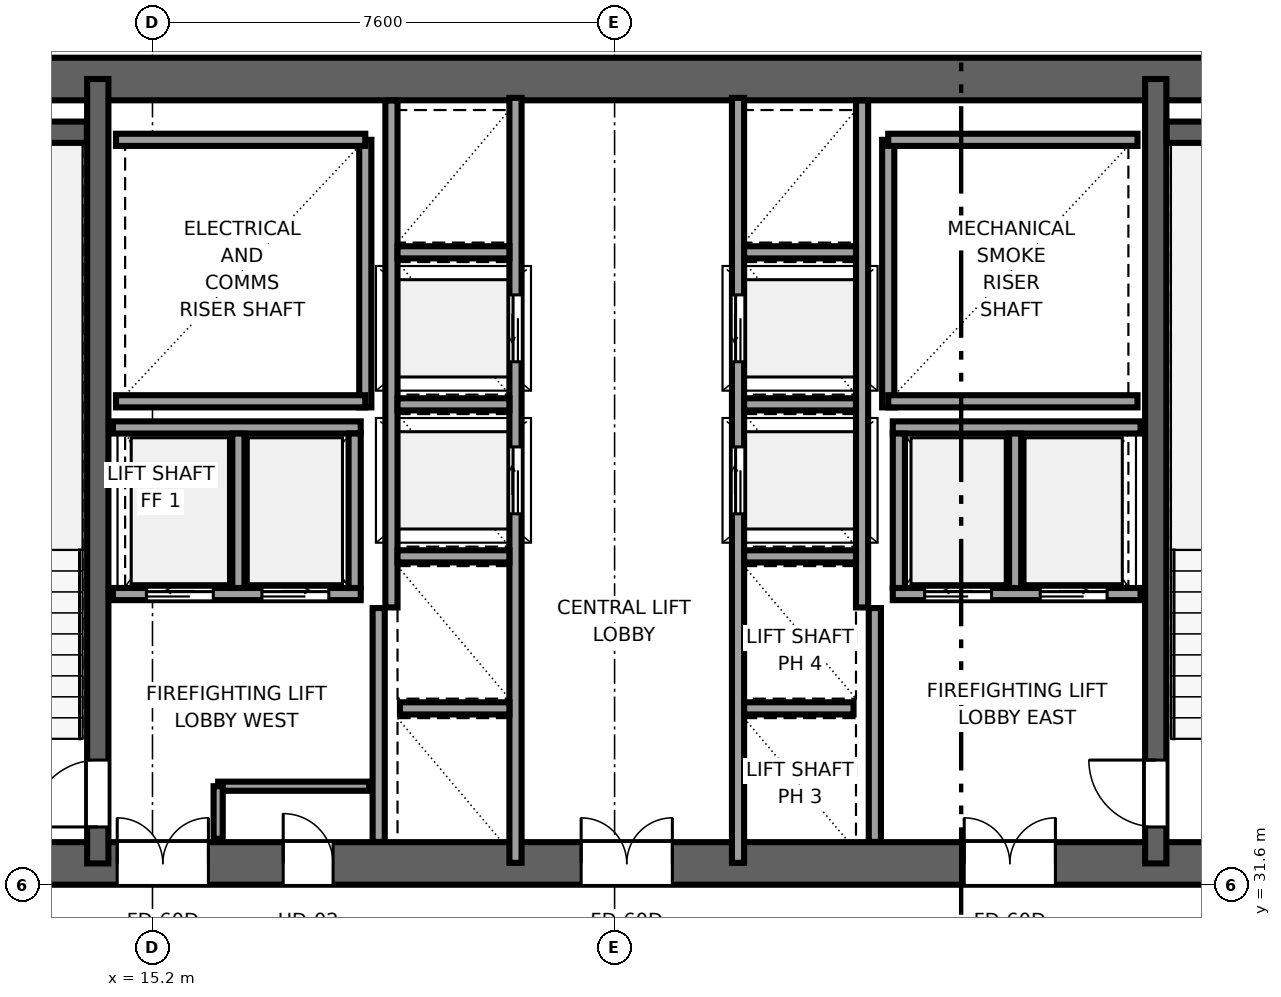
"""IFC4 building model, lengths in metres.
Left out: names, types, materials, properties, quantities, classifications, styles, units other than length and angle.
Written with IfcOpenShell. Run it as: python <this file> out.ifc"""

import sys

from ifc_helpers import new_model, si_unit, direction, frame, frame_2d, origin, place, context, subcontext, project, spatial, rectangle, extrude, source, transform, mapped, element, fill, save


model = new_model("IFC4")
c1 = context("Model", 3, precision=1e-05, world=origin(), true_north=direction((0.0, 1.0)))
c2 = subcontext(c1, "Body", "Model", "MODEL_VIEW")
j1 = project(units=[si_unit("LENGTHUNIT", "METRE"), si_unit("PLANEANGLEUNIT", "RADIAN")], contexts=[c1])
p1 = place(None, origin())
s1 = spatial("IfcSite", under=j1, at=p1, CompositionType="ELEMENT")
p2 = place(p1, origin())
s2 = spatial("IfcBuilding", under=s1, at=p2, CompositionType="ELEMENT")
p3 = place(p2, frame((0.0, 0.0, 143.5)))
s3 = spatial("IfcBuildingStorey", under=s2, at=p3, CompositionType="ELEMENT", Elevation=143.5)
p4 = place(p3, frame((9.8, 31.95, 0.0), z_axis=(0.0, 0.0, 1.0), x_axis=(1.0, 0.0, 0.0)))
e1 = element("IfcWall", 1, at=p4, inside=s3, PredefinedType="SHEAR", context=c2, shape_type="SweptSolid", body=[
    extrude(rectangle(XDim=26.4, YDim=0.7, at=frame_2d((13.2, 0.0))), origin(), (0.0, 0.0, 1.0), 3.55),
])
p5 = place(p4, frame((6.32, 0.0, 0.0), z_axis=(0.0, 0.0, 1.0), x_axis=(-1.0, 0.0, 0.0)))
e2 = element("IfcOpeningElement", 2, at=p5, cuts=e1, PredefinedType="OPENING", context=c2, shape_type="SweptSolid", body=[
    extrude(rectangle(XDim=1.5, YDim=2.04, at=frame_2d((0.75, 1.02))), frame((0.0, 0.36, 0.0), z_axis=(0.0, -1.0, 0.0), x_axis=(1.0, 0.0, 0.0)), (0.0, 0.0, 1.0), 0.72),
])
p6 = place(p4, frame((13.95, 0.0, 0.0), z_axis=(0.0, 0.0, 1.0), x_axis=(-1.0, 0.0, 0.0)))
e3 = element("IfcOpeningElement", 3, at=p6, cuts=e1, PredefinedType="OPENING", context=c2, shape_type="SweptSolid", body=[
    extrude(rectangle(XDim=1.5, YDim=2.04, at=frame_2d((0.75, 1.02))), frame((0.0, 0.36, 0.0), z_axis=(0.0, -1.0, 0.0), x_axis=(1.0, 0.0, 0.0)), (0.0, 0.0, 1.0), 0.72),
])
p7 = place(p4, frame((20.25, 0.0, 0.0), z_axis=(0.0, 0.0, 1.0), x_axis=(-1.0, 0.0, 0.0)))
e4 = element("IfcOpeningElement", 4, at=p7, cuts=e1, PredefinedType="OPENING", context=c2, shape_type="SweptSolid", body=[
    extrude(rectangle(XDim=1.5, YDim=2.04, at=frame_2d((0.75, 1.02))), frame((0.0, 0.36, 0.0), z_axis=(0.0, -1.0, 0.0), x_axis=(1.0, 0.0, 0.0)), (0.0, 0.0, 1.0), 0.72),
])
p8 = place(p4, frame((8.37, 0.0, 0.0), z_axis=(0.0, 0.0, 1.0), x_axis=(-1.0, 0.0, 0.0)))
e5 = element("IfcOpeningElement", 5, at=p8, cuts=e1, PredefinedType="OPENING", context=c2, shape_type="SweptSolid", body=[
    extrude(rectangle(XDim=0.82, YDim=2.01, at=frame_2d((0.41, 1.005))), frame((0.0, 0.36, 0.0), z_axis=(0.0, -1.0, 0.0), x_axis=(1.0, 0.0, 0.0)), (0.0, 0.0, 1.0), 0.72),
])
p9 = place(p3, frame((9.8, 44.85, 0.0), z_axis=(0.0, 0.0, 1.0), x_axis=(1.0, 0.0, 0.0)))
e6 = element("IfcWall", 6, at=p9, inside=s3, PredefinedType="SHEAR", context=c2, shape_type="SweptSolid", body=[
    extrude(rectangle(XDim=26.4, YDim=0.7, at=frame_2d((13.2, 0.0))), origin(), (0.0, 0.0, 1.0), 3.55),
])
p10 = place(p3, frame((14.3, 31.95, 0.0), z_axis=(0.0, 0.0, 1.0), x_axis=(0.0, 1.0, 0.0)))
e7 = element("IfcWall", 7, at=p10, inside=s3, PredefinedType="SHEAR", context=c2, shape_type="SweptSolid", body=[
    extrude(rectangle(XDim=12.9, YDim=0.35, at=frame_2d((6.45, 0.0))), origin(), (0.0, 0.0, 1.0), 3.55),
])
p11 = place(p10, frame((0.6, 0.0, 0.0)))
e8 = element("IfcOpeningElement", 8, at=p11, cuts=e7, PredefinedType="OPENING", context=c2, shape_type="SweptSolid", body=[
    extrude(rectangle(XDim=1.1, YDim=2.12, at=frame_2d((0.55, 1.06))), frame((0.0, 0.185, 0.0), z_axis=(0.0, -1.0, 0.0), x_axis=(1.0, 0.0, 0.0)), (0.0, 0.0, 1.0), 0.37),
])
p12 = place(p3, frame((31.7, 31.95, 0.0), z_axis=(0.0, 0.0, 1.0), x_axis=(0.0, 1.0, 0.0)))
e9 = element("IfcWall", 9, at=p12, inside=s3, PredefinedType="SHEAR", context=c2, shape_type="SweptSolid", body=[
    extrude(rectangle(XDim=12.9, YDim=0.35, at=frame_2d((6.45, 0.0))), origin(), (0.0, 0.0, 1.0), 3.55),
])
p13 = place(p12, frame((1.7, 0.0, 0.0), z_axis=(0.0, 0.0, 1.0), x_axis=(-1.0, 0.0, 0.0)))
e10 = element("IfcOpeningElement", 10, at=p13, cuts=e9, PredefinedType="OPENING", context=c2, shape_type="SweptSolid", body=[
    extrude(rectangle(XDim=1.1, YDim=2.12, at=frame_2d((0.55, 1.06))), frame((0.0, 0.185, 0.0), z_axis=(0.0, -1.0, 0.0), x_axis=(1.0, 0.0, 0.0)), (0.0, 0.0, 1.0), 0.37),
])
for number, where, z_axis, x_axis in (
    (11, (10.52, 43.975, 0.0), (0.0, 0.0, 1.0), (1.0, 0.0, 0.0)),
    (12, (31.88, 43.975, 0.0), (0.0, 0.0, 1.0), (1.0, 0.0, 0.0)),
):
    element("IfcWall", number, at=place(p3, frame(where, z_axis=z_axis, x_axis=x_axis)), inside=s3, PredefinedType="SHEAR", context=c2, shape_type="SweptSolid", body=[
        extrude(rectangle(XDim=3.6, YDim=0.35, at=frame_2d((1.8, 0.0))), origin(), (0.0, 0.0, 1.0), 3.55),
    ])
p14 = place(p3, frame((18.7, 39.45, 0.0), z_axis=(0.0, 0.0, 1.0), x_axis=(0.0, 1.0, 0.0)))
e13 = element("IfcWall", 13, at=p14, inside=s3, PredefinedType="SOLIDWALL", context=c2, shape_type="SweptSolid", body=[
    extrude(rectangle(XDim=4.4, YDim=0.2, at=frame_2d((2.2, 0.0))), origin(), (0.0, 0.0, 1.0), 3.29),
])
for number, where, z_axis, x_axis in (
    (14, (14.6, 39.55, 0.0), (0.0, 0.0, 1.0), (1.0, 0.0, 0.0)),
    (15, (14.6, 43.85, 0.0), (0.0, 0.0, 1.0), (1.0, 0.0, 0.0)),
):
    element("IfcWall", number, at=place(p3, frame(where, z_axis=z_axis, x_axis=x_axis)), inside=s3, PredefinedType="SOLIDWALL", context=c2, shape_type="SweptSolid", body=[
        extrude(rectangle(XDim=4.1, YDim=0.2, at=frame_2d((2.05, 0.0))), origin(), (0.0, 0.0, 1.0), 3.29),
    ])
p15 = place(p3, frame((27.3, 39.45, 0.0), z_axis=(0.0, 0.0, 1.0), x_axis=(0.0, 1.0, 0.0)))
e16 = element("IfcWall", 16, at=p15, inside=s3, PredefinedType="SOLIDWALL", context=c2, shape_type="SweptSolid", body=[
    extrude(rectangle(XDim=4.4, YDim=0.2, at=frame_2d((2.2, 0.0))), origin(), (0.0, 0.0, 1.0), 3.29),
])
for number, where, z_axis, x_axis in (
    (17, (27.3, 39.55, 0.0), (0.0, 0.0, 1.0), (1.0, 0.0, 0.0)),
    (18, (27.3, 43.85, 0.0), (0.0, 0.0, 1.0), (1.0, 0.0, 0.0)),
):
    element("IfcWall", number, at=place(p3, frame(where, z_axis=z_axis, x_axis=x_axis)), inside=s3, PredefinedType="SOLIDWALL", context=c2, shape_type="SweptSolid", body=[
        extrude(rectangle(XDim=4.1, YDim=0.2, at=frame_2d((2.05, 0.0))), origin(), (0.0, 0.0, 1.0), 3.29),
    ])
for number, where, z_axis, x_axis in (
    (19, (18.92, 32.304, 0.0), (0.0, 0.0, 1.0), (0.0, 1.0, 0.0)),
    (20, (27.08, 32.304, 0.0), (0.0, 0.0, 1.0), (0.0, 1.0, 0.0)),
):
    element("IfcWall", number, at=place(p3, frame(where, z_axis=z_axis, x_axis=x_axis)), inside=s3, PredefinedType="SOLIDWALL", context=c2, shape_type="SweptSolid", body=[
        extrude(rectangle(XDim=3.846, YDim=0.2, at=frame_2d((1.923, 0.0))), origin(), (0.0, 0.0, 1.0), 3.29),
    ])
p16 = place(p3, frame((21.17, 31.96, 0.0), z_axis=(0.0, 0.0, 1.0), x_axis=(0.0, 1.0, 0.0)))
e21 = element("IfcWall", 21, at=p16, inside=s3, PredefinedType="SOLIDWALL", context=c2, shape_type="SweptSolid", body=[
    extrude(rectangle(XDim=12.58, YDim=0.2, at=frame_2d((6.29, 0.0))), origin(), (0.0, 0.0, 1.0), 3.29),
])
p17 = place(p16, frame((5.74, 0.0, 0.0)))
e22 = element("IfcOpeningElement", 22, at=p17, cuts=e21, PredefinedType="OPENING", context=c2, shape_type="SweptSolid", body=[
    extrude(rectangle(XDim=1.1, YDim=2.12, at=frame_2d((0.55, 1.06))), frame((0.0, 0.11, 0.0), z_axis=(0.0, -1.0, 0.0), x_axis=(1.0, 0.0, 0.0)), (0.0, 0.0, 1.0), 0.22),
])
p18 = place(p16, frame((8.24, 0.0, 0.0)))
e23 = element("IfcOpeningElement", 23, at=p18, cuts=e21, PredefinedType="OPENING", context=c2, shape_type="SweptSolid", body=[
    extrude(rectangle(XDim=1.1, YDim=2.12, at=frame_2d((0.55, 1.06))), frame((0.0, 0.11, 0.0), z_axis=(0.0, -1.0, 0.0), x_axis=(1.0, 0.0, 0.0)), (0.0, 0.0, 1.0), 0.22),
])
p19 = place(p3, frame((19.13, 36.16, 0.0), z_axis=(0.0, 0.0, 1.0), x_axis=(0.0, 1.0, 0.0)))
e24 = element("IfcWall", 24, at=p19, inside=s3, PredefinedType="SOLIDWALL", context=c2, shape_type="SweptSolid", body=[
    extrude(rectangle(XDim=8.336, YDim=0.2, at=frame_2d((4.168, 0.0))), origin(), (0.0, 0.0, 1.0), 3.29),
])
p20 = place(p3, frame((19.27, 34.5, 0.0), z_axis=(0.0, 0.0, 1.0), x_axis=(1.0, 0.0, 0.0)))
e25 = element("IfcWall", 25, at=p20, inside=s3, PredefinedType="SOLIDWALL", context=c2, shape_type="SweptSolid", body=[
    extrude(rectangle(XDim=1.8, YDim=0.2, at=frame_2d((0.9, 0.0))), origin(), (0.0, 0.0, 1.0), 3.29),
])
for number, where, z_axis, x_axis in (
    (26, (19.23, 37.0, 0.0), (0.0, 0.0, 1.0), (1.0, 0.0, 0.0)),
    (27, (19.23, 39.5, 0.0), (0.0, 0.0, 1.0), (1.0, 0.0, 0.0)),
    (28, (19.23, 42.0, 0.0), (0.0, 0.0, 1.0), (1.0, 0.0, 0.0)),
):
    element("IfcWall", number, at=place(p3, frame(where, z_axis=z_axis, x_axis=x_axis)), inside=s3, PredefinedType="SOLIDWALL", context=c2, shape_type="SweptSolid", body=[
        extrude(rectangle(XDim=1.84, YDim=0.2, at=frame_2d((0.92, 0.0))), origin(), (0.0, 0.0, 1.0), 3.29),
    ])
p21 = place(p3, frame((27.375, 36.38, 0.0), z_axis=(0.0, 0.0, 1.0), x_axis=(1.0, 0.0, 0.0)))
e29 = element("IfcWall", 29, at=p21, inside=s3, PredefinedType="SOLIDWALL", context=c2, shape_type="SweptSolid", body=[
    extrude(rectangle(XDim=4.075, YDim=0.2, at=frame_2d((2.038, 0.0))), origin(), (0.0, 0.0, 1.0), 3.29),
])
p22 = place(p21, frame((0.525, 0.0, 0.0)))
e30 = element("IfcOpeningElement", 30, at=p22, cuts=e29, PredefinedType="OPENING", context=c2, shape_type="SweptSolid", body=[
    extrude(rectangle(XDim=1.1, YDim=2.12, at=frame_2d((0.55, 1.06))), frame((0.0, 0.11, 0.0), z_axis=(0.0, -1.0, 0.0), x_axis=(1.0, 0.0, 0.0)), (0.0, 0.0, 1.0), 0.22),
])
p23 = place(p21, frame((2.425, 0.0, 0.0)))
e31 = element("IfcOpeningElement", 31, at=p23, cuts=e29, PredefinedType="OPENING", context=c2, shape_type="SweptSolid", body=[
    extrude(rectangle(XDim=1.1, YDim=2.12, at=frame_2d((0.55, 1.06))), frame((0.0, 0.11, 0.0), z_axis=(0.0, -1.0, 0.0), x_axis=(1.0, 0.0, 0.0)), (0.0, 0.0, 1.0), 0.22),
])
p24 = place(p3, frame((27.375, 39.12, 0.0), z_axis=(0.0, 0.0, 1.0), x_axis=(1.0, 0.0, 0.0)))
e32 = element("IfcWall", 32, at=p24, inside=s3, PredefinedType="SOLIDWALL", context=c2, shape_type="SweptSolid", body=[
    extrude(rectangle(XDim=4.075, YDim=0.2, at=frame_2d((2.038, 0.0))), origin(), (0.0, 0.0, 1.0), 3.29),
])
for number, where, z_axis, x_axis in (
    (33, (27.475, 36.48, 0.0), (0.0, 0.0, 1.0), (0.0, 1.0, 0.0)),
    (34, (29.387, 36.48, 0.0), (0.0, 0.0, 1.0), (0.0, 1.0, 0.0)),
):
    element("IfcWall", number, at=place(p3, frame(where, z_axis=z_axis, x_axis=x_axis)), inside=s3, PredefinedType="SOLIDWALL", context=c2, shape_type="SweptSolid", body=[
        extrude(rectangle(XDim=2.54, YDim=0.2, at=frame_2d((1.27, 0.0))), origin(), (0.0, 0.0, 1.0), 3.29),
    ])
p25 = place(p3, frame((14.55, 36.38, 0.0), z_axis=(0.0, 0.0, 1.0), x_axis=(1.0, 0.0, 0.0)))
e35 = element("IfcWall", 35, at=p25, inside=s3, PredefinedType="SOLIDWALL", context=c2, shape_type="SweptSolid", body=[
    extrude(rectangle(XDim=4.075, YDim=0.2, at=frame_2d((2.038, 0.0))), origin(), (0.0, 0.0, 1.0), 3.29),
])
p26 = place(p25, frame((0.55, 0.0, 0.0)))
e36 = element("IfcOpeningElement", 36, at=p26, cuts=e35, PredefinedType="OPENING", context=c2, shape_type="SweptSolid", body=[
    extrude(rectangle(XDim=1.1, YDim=2.12, at=frame_2d((0.55, 1.06))), frame((0.0, 0.11, 0.0), z_axis=(0.0, -1.0, 0.0), x_axis=(1.0, 0.0, 0.0)), (0.0, 0.0, 1.0), 0.22),
])
p27 = place(p25, frame((2.45, 0.0, 0.0)))
e37 = element("IfcOpeningElement", 37, at=p27, cuts=e35, PredefinedType="OPENING", context=c2, shape_type="SweptSolid", body=[
    extrude(rectangle(XDim=1.1, YDim=2.12, at=frame_2d((0.55, 1.06))), frame((0.0, 0.11, 0.0), z_axis=(0.0, -1.0, 0.0), x_axis=(1.0, 0.0, 0.0)), (0.0, 0.0, 1.0), 0.22),
])
p28 = place(p3, frame((14.55, 39.12, 0.0), z_axis=(0.0, 0.0, 1.0), x_axis=(1.0, 0.0, 0.0)))
e38 = element("IfcWall", 38, at=p28, inside=s3, PredefinedType="SOLIDWALL", context=c2, shape_type="SweptSolid", body=[
    extrude(rectangle(XDim=4.075, YDim=0.2, at=frame_2d((2.038, 0.0))), origin(), (0.0, 0.0, 1.0), 3.29),
])
for number, where, z_axis, x_axis in (
    (39, (18.525, 36.48, 0.0), (0.0, 0.0, 1.0), (0.0, 1.0, 0.0)),
    (40, (16.613, 36.48, 0.0), (0.0, 0.0, 1.0), (0.0, 1.0, 0.0)),
):
    element("IfcWall", number, at=place(p3, frame(where, z_axis=z_axis, x_axis=x_axis)), inside=s3, PredefinedType="SOLIDWALL", context=c2, shape_type="SweptSolid", body=[
        extrude(rectangle(XDim=2.54, YDim=0.2, at=frame_2d((1.27, 0.0))), origin(), (0.0, 0.0, 1.0), 3.29),
    ])
p29 = place(p3, frame((24.83, 31.96, 0.0), z_axis=(0.0, 0.0, 1.0), x_axis=(0.0, 1.0, 0.0)))
e41 = element("IfcWall", 41, at=p29, inside=s3, PredefinedType="SOLIDWALL", context=c2, shape_type="SweptSolid", body=[
    extrude(rectangle(XDim=12.58, YDim=0.2, at=frame_2d((6.29, 0.0))), origin(), (0.0, 0.0, 1.0), 3.29),
])
p30 = place(p29, frame((5.74, 0.0, 0.0)))
e42 = element("IfcOpeningElement", 42, at=p30, cuts=e41, PredefinedType="OPENING", context=c2, shape_type="SweptSolid", body=[
    extrude(rectangle(XDim=1.1, YDim=2.12, at=frame_2d((0.55, 1.06))), frame((0.0, 0.11, 0.0), z_axis=(0.0, -1.0, 0.0), x_axis=(1.0, 0.0, 0.0)), (0.0, 0.0, 1.0), 0.22),
])
p31 = place(p29, frame((8.24, 0.0, 0.0)))
e43 = element("IfcOpeningElement", 43, at=p31, cuts=e41, PredefinedType="OPENING", context=c2, shape_type="SweptSolid", body=[
    extrude(rectangle(XDim=1.1, YDim=2.12, at=frame_2d((0.55, 1.06))), frame((0.0, 0.11, 0.0), z_axis=(0.0, -1.0, 0.0), x_axis=(1.0, 0.0, 0.0)), (0.0, 0.0, 1.0), 0.22),
])
p32 = place(p3, frame((26.87, 36.16, 0.0), z_axis=(0.0, 0.0, 1.0), x_axis=(0.0, 1.0, 0.0)))
e44 = element("IfcWall", 44, at=p32, inside=s3, PredefinedType="SOLIDWALL", context=c2, shape_type="SweptSolid", body=[
    extrude(rectangle(XDim=8.336, YDim=0.2, at=frame_2d((4.168, 0.0))), origin(), (0.0, 0.0, 1.0), 3.29),
])
p33 = place(p3, frame((24.93, 34.5, 0.0), z_axis=(0.0, 0.0, 1.0), x_axis=(1.0, 0.0, 0.0)))
e45 = element("IfcWall", 45, at=p33, inside=s3, PredefinedType="SOLIDWALL", context=c2, shape_type="SweptSolid", body=[
    extrude(rectangle(XDim=1.8, YDim=0.2, at=frame_2d((0.9, 0.0))), origin(), (0.0, 0.0, 1.0), 3.29),
])
for number, where, z_axis, x_axis in (
    (46, (24.93, 37.0, 0.0), (0.0, 0.0, 1.0), (1.0, 0.0, 0.0)),
    (47, (24.93, 39.5, 0.0), (0.0, 0.0, 1.0), (1.0, 0.0, 0.0)),
    (48, (24.93, 42.0, 0.0), (0.0, 0.0, 1.0), (1.0, 0.0, 0.0)),
):
    element("IfcWall", number, at=place(p3, frame(where, z_axis=z_axis, x_axis=x_axis)), inside=s3, PredefinedType="SOLIDWALL", context=c2, shape_type="SweptSolid", body=[
        extrude(rectangle(XDim=1.84, YDim=0.2, at=frame_2d((0.92, 0.0))), origin(), (0.0, 0.0, 1.0), 3.29),
    ])
p34 = place(p3, frame((16.28, 33.22, 0.0), z_axis=(0.0, 0.0, 1.0), x_axis=(1.0, 0.0, 0.0)))
e49 = element("IfcWall", 49, at=p34, inside=s3, PredefinedType="PARTITIONING", context=c2, shape_type="SweptSolid", body=[
    extrude(rectangle(XDim=2.485, YDim=0.15, at=frame_2d((1.242, 0.0))), origin(), (0.0, 0.0, 1.0), 3.29),
])
p35 = place(p3, frame((16.28, 32.355, 0.0), z_axis=(0.0, 0.0, 1.0), x_axis=(0.0, 1.0, 0.0)))
e50 = element("IfcWall", 50, at=p35, inside=s3, PredefinedType="PARTITIONING", context=c2, shape_type="SweptSolid", body=[
    extrude(rectangle(XDim=0.865, YDim=0.15, at=frame_2d((0.433, 0.0))), origin(), (0.0, 0.0, 1.0), 3.29),
])
m1 = source(origin(), c2, "Body", "SweptSolid", [
    extrude(rectangle(XDim=1.1, YDim=2.12, at=frame_2d((0.55, 1.06))), frame((0.0, 0.025, 0.0), z_axis=(0.0, -1.0, 0.0), x_axis=(1.0, 0.0, 0.0)), (0.0, 0.0, 1.0), 0.05),
])
p36 = place(p11, origin())
e51 = element("IfcDoor", 51, at=p36, inside=s3, OperationType="SINGLE_SWING_LEFT", PredefinedType="DOOR", context=c2, shape_type="MappedRepresentation", body=[
    mapped(m1, transform((0.0, 0.0, 0.0), x_axis=(1.0, 0.0, 0.0), y_axis=(0.0, 1.0, 0.0), z_axis=(0.0, 0.0, 1.0), scale=1.0)),
])
fill(e8, e51)
p37 = place(p13, origin())
e52 = element("IfcDoor", 52, at=p37, inside=s3, OperationType="SINGLE_SWING_RIGHT", PredefinedType="DOOR", context=c2, shape_type="MappedRepresentation", body=[
    mapped(m1, transform((0.0, 0.0, 0.0), x_axis=(1.0, 0.0, 0.0), y_axis=(0.0, 1.0, 0.0), z_axis=(0.0, 0.0, 1.0), scale=1.0)),
])
fill(e10, e52)
m2 = source(origin(), c2, "Body", "SweptSolid", [
    extrude(rectangle(XDim=1.5, YDim=2.04, at=frame_2d((0.75, 1.02))), frame((0.0, 0.025, 0.0), z_axis=(0.0, -1.0, 0.0), x_axis=(1.0, 0.0, 0.0)), (0.0, 0.0, 1.0), 0.05),
])
p38 = place(p5, origin())
e53 = element("IfcDoor", 53, at=p38, inside=s3, OperationType="DOUBLE_DOOR_SINGLE_SWING", PredefinedType="DOOR", context=c2, shape_type="MappedRepresentation", body=[
    mapped(m2, transform((0.0, 0.0, 0.0), x_axis=(1.0, 0.0, 0.0), y_axis=(0.0, 1.0, 0.0), z_axis=(0.0, 0.0, 1.0), scale=1.0)),
])
fill(e2, e53)
p39 = place(p6, origin())
e54 = element("IfcDoor", 54, at=p39, inside=s3, OperationType="DOUBLE_DOOR_SINGLE_SWING", PredefinedType="DOOR", context=c2, shape_type="MappedRepresentation", body=[
    mapped(m2, transform((0.0, 0.0, 0.0), x_axis=(1.0, 0.0, 0.0), y_axis=(0.0, 1.0, 0.0), z_axis=(0.0, 0.0, 1.0), scale=1.0)),
])
fill(e3, e54)
p40 = place(p7, origin())
e55 = element("IfcDoor", 55, at=p40, inside=s3, OperationType="DOUBLE_DOOR_SINGLE_SWING", PredefinedType="DOOR", context=c2, shape_type="MappedRepresentation", body=[
    mapped(m2, transform((0.0, 0.0, 0.0), x_axis=(1.0, 0.0, 0.0), y_axis=(0.0, 1.0, 0.0), z_axis=(0.0, 0.0, 1.0), scale=1.0)),
])
fill(e4, e55)
m3 = source(origin(), c2, "Body", "SweptSolid", [
    extrude(rectangle(XDim=0.82, YDim=2.01, at=frame_2d((0.41, 1.005))), frame((0.0, 0.025, 0.0), z_axis=(0.0, -1.0, 0.0), x_axis=(1.0, 0.0, 0.0)), (0.0, 0.0, 1.0), 0.05),
])
p41 = place(p8, origin())
e56 = element("IfcDoor", 56, at=p41, inside=s3, OperationType="SINGLE_SWING_LEFT", PredefinedType="DOOR", context=c2, shape_type="MappedRepresentation", body=[
    mapped(m3, transform((0.0, 0.0, 0.0), x_axis=(1.0, 0.0, 0.0), y_axis=(0.0, 1.0, 0.0), z_axis=(0.0, 0.0, 1.0), scale=1.0)),
])
fill(e5, e56)
m4 = source(origin(), c2, "Body", "SweptSolid", [
    extrude(rectangle(XDim=1.1, YDim=2.12, at=frame_2d((0.55, 1.06))), frame((0.0, 0.025, 0.0), z_axis=(0.0, -1.0, 0.0), x_axis=(1.0, 0.0, 0.0)), (0.0, 0.0, 1.0), 0.05),
])
p42 = place(p17, origin())
e57 = element("IfcDoor", 57, at=p42, inside=s3, OperationType="SLIDING_TO_RIGHT", PredefinedType="DOOR", context=c2, shape_type="MappedRepresentation", body=[
    mapped(m4, transform((0.0, 0.0, 0.0), x_axis=(1.0, 0.0, 0.0), y_axis=(0.0, 1.0, 0.0), z_axis=(0.0, 0.0, 1.0), scale=1.0)),
])
fill(e22, e57)
p43 = place(p18, origin())
e58 = element("IfcDoor", 58, at=p43, inside=s3, OperationType="SLIDING_TO_LEFT", PredefinedType="DOOR", context=c2, shape_type="MappedRepresentation", body=[
    mapped(m4, transform((0.0, 0.0, 0.0), x_axis=(1.0, 0.0, 0.0), y_axis=(0.0, 1.0, 0.0), z_axis=(0.0, 0.0, 1.0), scale=1.0)),
])
fill(e23, e58)
p44 = place(p22, origin())
e59 = element("IfcDoor", 59, at=p44, inside=s3, OperationType="SLIDING_TO_LEFT", PredefinedType="DOOR", context=c2, shape_type="MappedRepresentation", body=[
    mapped(m4, transform((0.0, 0.0, 0.0), x_axis=(1.0, 0.0, 0.0), y_axis=(0.0, 1.0, 0.0), z_axis=(0.0, 0.0, 1.0), scale=1.0)),
])
fill(e30, e59)
p45 = place(p23, origin())
e60 = element("IfcDoor", 60, at=p45, inside=s3, OperationType="SLIDING_TO_RIGHT", PredefinedType="DOOR", context=c2, shape_type="MappedRepresentation", body=[
    mapped(m4, transform((0.0, 0.0, 0.0), x_axis=(1.0, 0.0, 0.0), y_axis=(0.0, 1.0, 0.0), z_axis=(0.0, 0.0, 1.0), scale=1.0)),
])
fill(e31, e60)
p46 = place(p26, origin())
e61 = element("IfcDoor", 61, at=p46, inside=s3, OperationType="SLIDING_TO_LEFT", PredefinedType="DOOR", context=c2, shape_type="MappedRepresentation", body=[
    mapped(m4, transform((0.0, 0.0, 0.0), x_axis=(1.0, 0.0, 0.0), y_axis=(0.0, 1.0, 0.0), z_axis=(0.0, 0.0, 1.0), scale=1.0)),
])
fill(e36, e61)
p47 = place(p27, origin())
e62 = element("IfcDoor", 62, at=p47, inside=s3, OperationType="SLIDING_TO_RIGHT", PredefinedType="DOOR", context=c2, shape_type="MappedRepresentation", body=[
    mapped(m4, transform((0.0, 0.0, 0.0), x_axis=(1.0, 0.0, 0.0), y_axis=(0.0, 1.0, 0.0), z_axis=(0.0, 0.0, 1.0), scale=1.0)),
])
fill(e37, e62)
p48 = place(p30, origin())
e63 = element("IfcDoor", 63, at=p48, inside=s3, OperationType="SLIDING_TO_RIGHT", PredefinedType="DOOR", context=c2, shape_type="MappedRepresentation", body=[
    mapped(m4, transform((0.0, 0.0, 0.0), x_axis=(1.0, 0.0, 0.0), y_axis=(0.0, 1.0, 0.0), z_axis=(0.0, 0.0, 1.0), scale=1.0)),
])
fill(e42, e63)
p49 = place(p31, origin())
e64 = element("IfcDoor", 64, at=p49, inside=s3, OperationType="SLIDING_TO_LEFT", PredefinedType="DOOR", context=c2, shape_type="MappedRepresentation", body=[
    mapped(m4, transform((0.0, 0.0, 0.0), x_axis=(1.0, 0.0, 0.0), y_axis=(0.0, 1.0, 0.0), z_axis=(0.0, 0.0, 1.0), scale=1.0)),
])
fill(e43, e64)
save(model, sys.argv[1])
